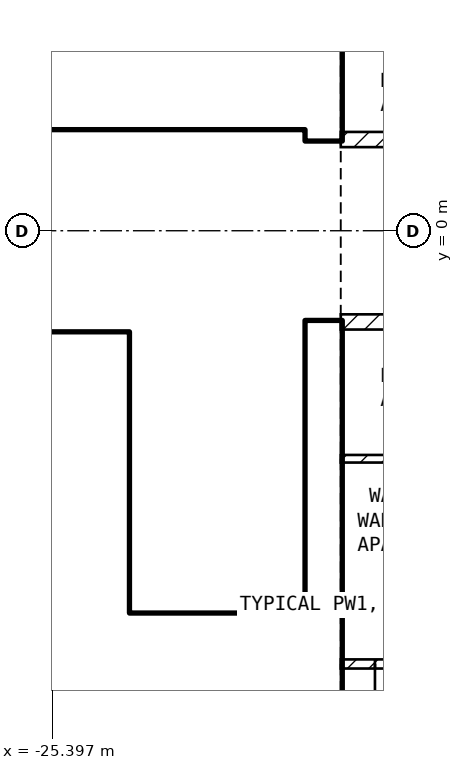
"""IFC4 building model, lengths in metres.
Left out: names, types, materials, properties, quantities, classifications, styles, units other than length and angle.
Written with IfcOpenShell. Run it as: python <this file> out.ifc"""

import sys

from ifc_helpers import new_model, si_unit, direction, frame, frame_2d, origin, place, context, subcontext, project, spatial, rectangle, extrude, element, fill, save


model = new_model("IFC4")
c1 = context("Model", 3, precision=1e-05, world=origin(), true_north=direction((0.0, 1.0)))
c2 = subcontext(c1, "Body", "Model", "MODEL_VIEW")
j1 = project(units=[si_unit("LENGTHUNIT", "METRE"), si_unit("PLANEANGLEUNIT", "RADIAN")], contexts=[c1])
p1 = place(None, origin())
s1 = spatial("IfcSite", under=j1, at=p1, CompositionType="ELEMENT")
p2 = place(p1, origin())
s2 = spatial("IfcBuilding", under=s1, at=p2, CompositionType="ELEMENT")
p3 = place(p2, frame((0.0, 0.0, 264.0)))
s3 = spatial("IfcBuildingStorey", under=s2, at=p3, CompositionType="ELEMENT", Elevation=264.0)
for number, where, z_axis, x_axis in (
    (1, (-21.825, -8.1, 0.0), (0.0, 0.0, 1.0), (0.0, 1.0, 0.0)),
    (2, (-21.825, 1.2, 0.0), (0.0, 0.0, 1.0), (0.0, 1.0, 0.0)),
):
    element("IfcWall", number, at=place(p3, frame(where, z_axis=z_axis, x_axis=x_axis)), inside=s3, PredefinedType="SHEAR", context=c2, shape_type="SweptSolid", body=[
        extrude(rectangle(XDim=6.9, YDim=0.45, at=frame_2d((3.45, 0.0))), origin(), (0.0, 0.0, 1.0), 3.25),
    ])
p4 = place(p3, frame((-33.35, 1.45, 0.0), z_axis=(0.0, 0.0, 1.0), x_axis=(1.0, 0.0, 0.0)))
e3 = element("IfcWall", 3, at=p4, inside=s3, PredefinedType="SOLIDWALL", context=c2, shape_type="SweptSolid", body=[
    extrude(rectangle(XDim=11.3, YDim=0.2, at=frame_2d((5.65, 0.0))), origin(), (0.0, 0.0, 1.0), 3.25),
])
p5 = place(p4, frame((9.55, 0.0, 0.0)))
e4 = element("IfcOpeningElement", 4, at=p5, cuts=e3, PredefinedType="OPENING", context=c2, shape_type="SweptSolid", body=[
    extrude(rectangle(XDim=1.0, YDim=2.1, at=frame_2d((0.5, 1.05))), frame((0.0, 0.11, 0.0), z_axis=(0.0, -1.0, 0.0), x_axis=(1.0, 0.0, 0.0)), (0.0, 0.0, 1.0), 0.22),
])
p6 = place(p4, frame((7.05, 0.0, 0.0)))
e5 = element("IfcOpeningElement", 5, at=p6, cuts=e3, PredefinedType="OPENING", context=c2, shape_type="SweptSolid", body=[
    extrude(rectangle(XDim=1.0, YDim=2.1, at=frame_2d((0.5, 1.05))), frame((0.0, 0.11, 0.0), z_axis=(0.0, -1.0, 0.0), x_axis=(1.0, 0.0, 0.0)), (0.0, 0.0, 1.0), 0.22),
])
p7 = place(p4, frame((1.175, 0.0, 0.0)))
e6 = element("IfcOpeningElement", 6, at=p7, cuts=e3, PredefinedType="OPENING", context=c2, shape_type="SweptSolid", body=[
    extrude(rectangle(XDim=0.9, YDim=2.1, at=frame_2d((0.45, 1.05))), frame((0.0, 0.11, 0.0), z_axis=(0.0, -1.0, 0.0), x_axis=(1.0, 0.0, 0.0)), (0.0, 0.0, 1.0), 0.22),
])
p8 = place(p3, frame((-24.5, -5.05, 0.0), z_axis=(0.0, 0.0, 1.0), x_axis=(0.0, 1.0, 0.0)))
e7 = element("IfcWall", 7, at=p8, inside=s3, PredefinedType="SOLIDWALL", context=c2, shape_type="SweptSolid", body=[
    extrude(rectangle(XDim=3.7, YDim=0.2, at=frame_2d((1.85, 0.0))), origin(), (0.0, 0.0, 1.0), 3.25),
])
p9 = place(p8, frame((0.1, 0.0, 0.0)))
e8 = element("IfcOpeningElement", 8, at=p9, cuts=e7, PredefinedType="OPENING", context=c2, shape_type="SweptSolid", body=[
    extrude(rectangle(XDim=0.8, YDim=2.1, at=frame_2d((0.4, 1.05))), frame((0.0, 0.11, 0.0), z_axis=(0.0, -1.0, 0.0), x_axis=(1.0, 0.0, 0.0)), (0.0, 0.0, 1.0), 0.22),
])
p10 = place(p3, frame((-28.35, -5.15, 0.0), z_axis=(0.0, 0.0, 1.0), x_axis=(1.0, 0.0, 0.0)))
e9 = element("IfcWall", 9, at=p10, inside=s3, PredefinedType="SOLIDWALL", context=c2, shape_type="SweptSolid", body=[
    extrude(rectangle(XDim=6.3, YDim=0.2, at=frame_2d((3.15, 0.0))), origin(), (0.0, 0.0, 1.0), 3.25),
])
p11 = place(p10, frame((5.1, 0.0, 0.0)))
e10 = element("IfcOpeningElement", 10, at=p11, cuts=e9, PredefinedType="OPENING", context=c2, shape_type="SweptSolid", body=[
    extrude(rectangle(XDim=1.0, YDim=2.1, at=frame_2d((0.5, 1.05))), frame((0.0, 0.11, 0.0), z_axis=(0.0, -1.0, 0.0), x_axis=(1.0, 0.0, 0.0)), (0.0, 0.0, 1.0), 0.22),
])
p12 = place(p3, frame((-33.35, -1.45, 0.0), z_axis=(0.0, 0.0, 1.0), x_axis=(1.0, 0.0, 0.0)))
e11 = element("IfcWall", 11, at=p12, inside=s3, PredefinedType="SOLIDWALL", context=c2, shape_type="SweptSolid", body=[
    extrude(rectangle(XDim=8.75, YDim=0.2, at=frame_2d((4.375, 0.0))), origin(), (0.0, 0.0, 1.0), 3.25),
])
p13 = place(p12, frame((7.35, 0.0, 0.0)))
e12 = element("IfcOpeningElement", 12, at=p13, cuts=e11, PredefinedType="OPENING", context=c2, shape_type="SweptSolid", body=[
    extrude(rectangle(XDim=1.0, YDim=2.1, at=frame_2d((0.5, 1.05))), frame((0.0, 0.11, 0.0), z_axis=(0.0, -1.0, 0.0), x_axis=(1.0, 0.0, 0.0)), (0.0, 0.0, 1.0), 0.22),
])
p14 = place(p12, frame((5.35, 0.0, 0.0)))
e13 = element("IfcOpeningElement", 13, at=p14, cuts=e11, PredefinedType="OPENING", context=c2, shape_type="SweptSolid", body=[
    extrude(rectangle(XDim=1.0, YDim=2.1, at=frame_2d((0.5, 1.05))), frame((0.0, 0.11, 0.0), z_axis=(0.0, -1.0, 0.0), x_axis=(1.0, 0.0, 0.0)), (0.0, 0.0, 1.0), 0.22),
])
p15 = place(p12, frame((3.35, 0.0, 0.0)))
e14 = element("IfcOpeningElement", 14, at=p15, cuts=e11, PredefinedType="OPENING", context=c2, shape_type="SweptSolid", body=[
    extrude(rectangle(XDim=1.0, YDim=2.1, at=frame_2d((0.5, 1.05))), frame((0.0, 0.11, 0.0), z_axis=(0.0, -1.0, 0.0), x_axis=(1.0, 0.0, 0.0)), (0.0, 0.0, 1.0), 0.22),
])
p16 = place(p12, frame((0.925, 0.0, 0.0)))
e15 = element("IfcOpeningElement", 15, at=p16, cuts=e11, PredefinedType="OPENING", context=c2, shape_type="SweptSolid", body=[
    extrude(rectangle(XDim=0.9, YDim=2.1, at=frame_2d((0.45, 1.05))), frame((0.0, 0.11, 0.0), z_axis=(0.0, -1.0, 0.0), x_axis=(1.0, 0.0, 0.0)), (0.0, 0.0, 1.0), 0.22),
])
p17 = place(p3, frame((-33.35, -3.95, 0.0), z_axis=(0.0, 0.0, 1.0), x_axis=(1.0, 0.0, 0.0)))
e16 = element("IfcWall", 16, at=p17, inside=s3, PredefinedType="SOLIDWALL", context=c2, shape_type="SweptSolid", body=[
    extrude(rectangle(XDim=8.75, YDim=0.2, at=frame_2d((4.375, 0.0))), origin(), (0.0, 0.0, 1.0), 3.25),
])
p18 = place(p3, frame((-21.6, 1.2, 0.0), z_axis=(0.0, 0.0, 1.0), x_axis=(1.0, 0.0, 0.0)))
e17 = element("IfcWall", 17, at=p18, inside=s3, PredefinedType="PARTITIONING", context=c2, shape_type="SweptSolid", body=[
    extrude(rectangle(XDim=17.2, YDim=0.2, at=frame_2d((8.6, 0.0))), origin(), (0.0, 0.0, 1.0), 3.25),
])
p19 = place(p18, frame((3.85, 0.0, 0.0)))
e18 = element("IfcOpeningElement", 18, at=p19, cuts=e17, PredefinedType="OPENING", context=c2, shape_type="SweptSolid", body=[
    extrude(rectangle(XDim=1.0, YDim=2.1, at=frame_2d((0.5, 1.05))), frame((0.0, 0.11, 0.0), z_axis=(0.0, -1.0, 0.0), x_axis=(1.0, 0.0, 0.0)), (0.0, 0.0, 1.0), 0.22),
])
p20 = place(p3, frame((-4.4, -1.2, 0.0), z_axis=(0.0, 0.0, 1.0), x_axis=(-1.0, 0.0, 0.0)))
e19 = element("IfcWall", 19, at=p20, inside=s3, PredefinedType="PARTITIONING", context=c2, shape_type="SweptSolid", body=[
    extrude(rectangle(XDim=17.2, YDim=0.2, at=frame_2d((8.6, 0.0))), origin(), (0.0, 0.0, 1.0), 3.25),
])
p21 = place(p20, frame((11.6, 0.0, 0.0)))
e20 = element("IfcOpeningElement", 20, at=p21, cuts=e19, PredefinedType="OPENING", context=c2, shape_type="SweptSolid", body=[
    extrude(rectangle(XDim=1.0, YDim=2.1, at=frame_2d((0.5, 1.05))), frame((0.0, 0.11, 0.0), z_axis=(0.0, -1.0, 0.0), x_axis=(1.0, 0.0, 0.0)), (0.0, 0.0, 1.0), 0.22),
])
p22 = place(p3, frame((-18.1, -3.0, 0.0), z_axis=(0.0, 0.0, 1.0), x_axis=(-1.0, 0.0, 0.0)))
e21 = element("IfcWall", 21, at=p22, inside=s3, PredefinedType="PARTITIONING", context=c2, shape_type="SweptSolid", body=[
    extrude(rectangle(XDim=3.5, YDim=0.1, at=frame_2d((1.75, 0.0))), origin(), (0.0, 0.0, 1.0), 3.25),
])
p23 = place(p3, frame((-19.8, -5.7, 0.0), z_axis=(0.0, 0.0, 1.0), x_axis=(-1.0, 0.0, 0.0)))
e22 = element("IfcWall", 22, at=p23, inside=s3, PredefinedType="PARTITIONING", context=c2, shape_type="SweptSolid", body=[
    extrude(rectangle(XDim=1.8, YDim=0.12, at=frame_2d((0.9, 0.0))), origin(), (0.0, 0.0, 1.0), 3.25),
])
p24 = place(p23, frame((0.45, 0.0, 0.0)))
e23 = element("IfcOpeningElement", 23, at=p24, cuts=e22, PredefinedType="OPENING", context=c2, shape_type="SweptSolid", body=[
    extrude(rectangle(XDim=0.9, YDim=2.1, at=frame_2d((0.45, 1.05))), frame((0.0, 0.07, 0.0), z_axis=(0.0, -1.0, 0.0), x_axis=(1.0, 0.0, 0.0)), (0.0, 0.0, 1.0), 0.14),
])
p25 = place(p13, origin())
e24 = element("IfcDoor", 24, at=p25, inside=s3, OperationType="DOUBLE_DOOR_SLIDING", PredefinedType="DOOR", context=c2, shape_type="SweptSolid", body=[
    extrude(rectangle(XDim=1.0, YDim=2.1, at=frame_2d((0.5, 1.05))), frame((0.0, 0.025, 0.0), z_axis=(0.0, -1.0, 0.0), x_axis=(1.0, 0.0, 0.0)), (0.0, 0.0, 1.0), 0.05),
])
fill(e12, e24)
p26 = place(p11, origin())
e25 = element("IfcDoor", 25, at=p26, inside=s3, OperationType="SINGLE_SWING_LEFT", PredefinedType="DOOR", context=c2, shape_type="SweptSolid", body=[
    extrude(rectangle(XDim=1.0, YDim=2.1, at=frame_2d((0.5, 1.05))), frame((0.0, 0.025, 0.0), z_axis=(0.0, -1.0, 0.0), x_axis=(1.0, 0.0, 0.0)), (0.0, 0.0, 1.0), 0.05),
])
fill(e10, e25)
p27 = place(p5, origin())
e26 = element("IfcDoor", 26, at=p27, inside=s3, OperationType="SINGLE_SWING_LEFT", PredefinedType="DOOR", context=c2, shape_type="SweptSolid", body=[
    extrude(rectangle(XDim=1.0, YDim=2.1, at=frame_2d((0.5, 1.05))), frame((0.0, 0.025, 0.0), z_axis=(0.0, -1.0, 0.0), x_axis=(1.0, 0.0, 0.0)), (0.0, 0.0, 1.0), 0.05),
])
fill(e4, e26)
p28 = place(p9, origin())
e27 = element("IfcDoor", 27, at=p28, inside=s3, OperationType="SINGLE_SWING_LEFT", PredefinedType="DOOR", context=c2, shape_type="SweptSolid", body=[
    extrude(rectangle(XDim=0.8, YDim=2.1, at=frame_2d((0.4, 1.05))), frame((0.0, 0.025, 0.0), z_axis=(0.0, -1.0, 0.0), x_axis=(1.0, 0.0, 0.0)), (0.0, 0.0, 1.0), 0.05),
])
fill(e8, e27)
p29 = place(p6, origin())
e28 = element("IfcDoor", 28, at=p29, inside=s3, OperationType="SINGLE_SWING_LEFT", PredefinedType="DOOR", context=c2, shape_type="SweptSolid", body=[
    extrude(rectangle(XDim=1.0, YDim=2.1, at=frame_2d((0.5, 1.05))), frame((0.0, 0.025, 0.0), z_axis=(0.0, -1.0, 0.0), x_axis=(1.0, 0.0, 0.0)), (0.0, 0.0, 1.0), 0.05),
])
fill(e5, e28)
p30 = place(p24, origin())
e29 = element("IfcDoor", 29, at=p30, inside=s3, OperationType="SINGLE_SWING_RIGHT", PredefinedType="DOOR", context=c2, shape_type="SweptSolid", body=[
    extrude(rectangle(XDim=0.9, YDim=2.1, at=frame_2d((0.45, 1.05))), frame((0.0, 0.025, 0.0), z_axis=(0.0, -1.0, 0.0), x_axis=(1.0, 0.0, 0.0)), (0.0, 0.0, 1.0), 0.05),
])
fill(e23, e29)
save(model, sys.argv[1])
